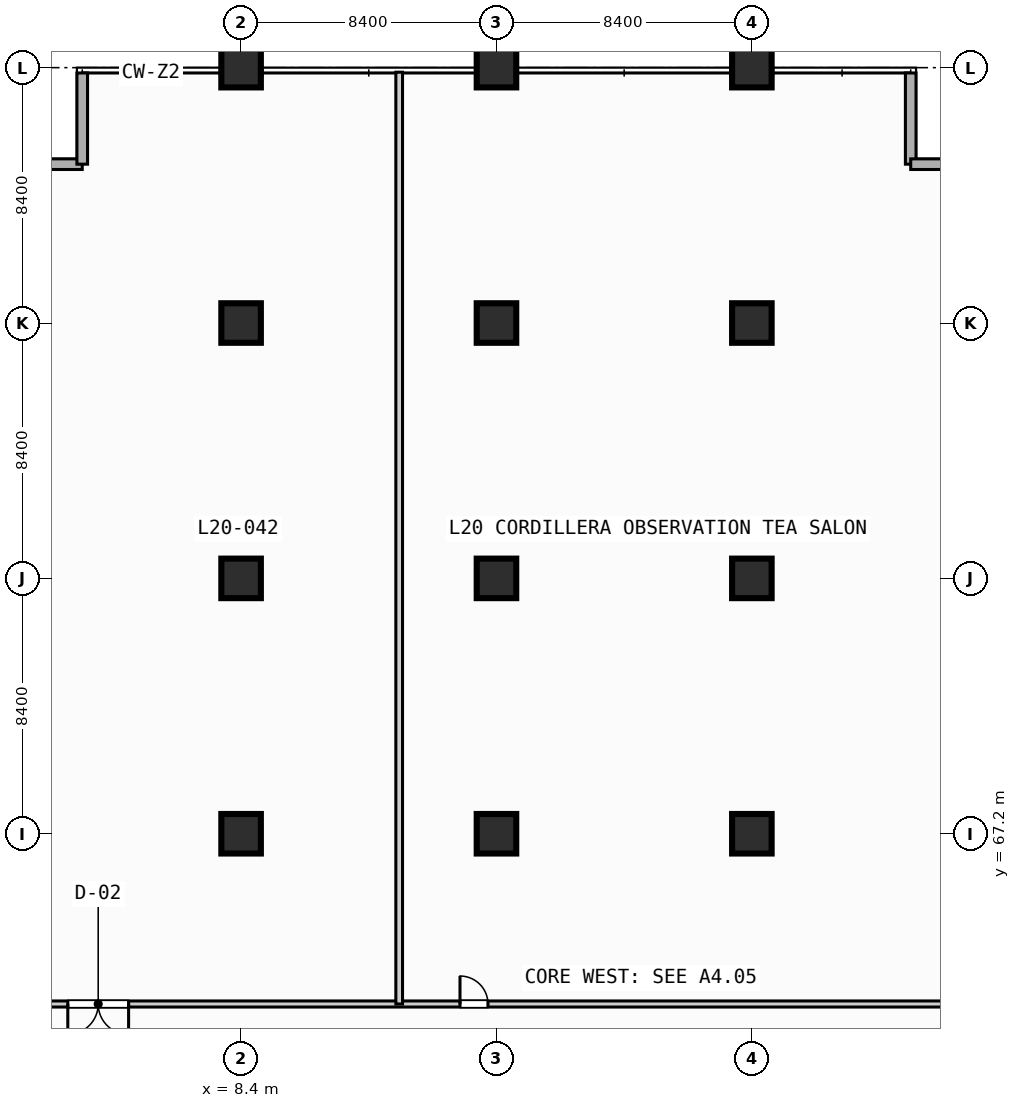
"""IFC4 building model, lengths in metres.
Left out: names, types, materials, properties, quantities, classifications, styles, units other than length and angle.
Written with IfcOpenShell. Run it as: python <this file> out.ifc"""

import sys

from ifc_helpers import new_model, si_unit, direction, frame, frame_2d, origin, origin_2d, place, context, subcontext, project, spatial, rectangle, extrude, element, fill, save


model = new_model("IFC4")
c1 = context("Model", 3, precision=1e-05, world=origin(), true_north=direction((0.0, 1.0)))
c2 = subcontext(c1, "Body", "Model", "MODEL_VIEW")
j1 = project(units=[si_unit("LENGTHUNIT", "METRE"), si_unit("PLANEANGLEUNIT", "RADIAN")], contexts=[c1])
p1 = place(None, origin())
s1 = spatial("IfcSite", under=j1, at=p1, CompositionType="ELEMENT")
p2 = place(p1, origin())
s2 = spatial("IfcBuilding", under=s1, at=p2, CompositionType="ELEMENT")
p3 = place(p2, frame((0.0, 0.0, 85.2)))
s3 = spatial("IfcBuildingStorey", under=s2, at=p3, CompositionType="ELEMENT", Elevation=85.2)
for number, where, z_axis, x_axis in (
    (1, (8.4, 67.2, 0.0), (0.0, 0.0, 1.0), (1.0, 0.0, 0.0)),
    (2, (8.4, 75.6, 0.0), (0.0, 0.0, 1.0), (1.0, 0.0, 0.0)),
    (3, (8.4, 84.0, 0.0), (0.0, 0.0, 1.0), (1.0, 0.0, 0.0)),
    (4, (8.4, 92.4, 0.0), (0.0, 0.0, 1.0), (1.0, 0.0, 0.0)),
    (5, (16.8, 67.2, 0.0), (0.0, 0.0, 1.0), (1.0, 0.0, 0.0)),
    (6, (16.8, 75.6, 0.0), (0.0, 0.0, 1.0), (1.0, 0.0, 0.0)),
    (7, (16.8, 84.0, 0.0), (0.0, 0.0, 1.0), (1.0, 0.0, 0.0)),
    (8, (16.8, 92.4, 0.0), (0.0, 0.0, 1.0), (1.0, 0.0, 0.0)),
    (9, (25.2, 67.2, 0.0), (0.0, 0.0, 1.0), (1.0, 0.0, 0.0)),
    (10, (25.2, 75.6, 0.0), (0.0, 0.0, 1.0), (1.0, 0.0, 0.0)),
    (11, (25.2, 84.0, 0.0), (0.0, 0.0, 1.0), (1.0, 0.0, 0.0)),
    (12, (25.2, 92.4, 0.0), (0.0, 0.0, 1.0), (1.0, 0.0, 0.0)),
):
    element("IfcColumn", number, at=place(p3, frame(where, z_axis=z_axis, x_axis=x_axis)), inside=s3, PredefinedType="COLUMN", context=c2, shape_type="SweptSolid", body=[
        extrude(rectangle(XDim=1.3, YDim=1.3, at=origin_2d()), origin(), (0.0, 0.0, 1.0), 4.4),
    ])
for number, where, z_axis, x_axis in (
    (13, (0.175, 89.225, 0.0), (0.0, 0.0, 1.0), (1.0, 0.0, 0.0)),
    (14, (3.175, 89.225, 0.0), (0.0, 0.0, 1.0), (0.0, 1.0, 0.0)),
    (15, (30.425, 92.225, 0.0), (0.0, 0.0, 1.0), (0.0, -1.0, 0.0)),
    (16, (30.425, 89.225, 0.0), (0.0, 0.0, 1.0), (1.0, 0.0, 0.0)),
):
    element("IfcWall", number, at=place(p3, frame(where, z_axis=z_axis, x_axis=x_axis)), inside=s3, PredefinedType="STANDARD", context=c2, shape_type="SweptSolid", body=[
        extrude(rectangle(XDim=3.0, YDim=0.35, at=frame_2d((1.5, 0.0))), origin(), (0.0, 0.0, 1.0), 4.15),
    ])
p4 = place(p3, frame((0.3, 61.6, 0.0), z_axis=(0.0, 0.0, 1.0), x_axis=(1.0, 0.0, 0.0)))
e17 = element("IfcWall", 17, at=p4, inside=s3, PredefinedType="PARTITIONING", context=c2, shape_type="SweptSolid", body=[
    extrude(rectangle(XDim=33.0, YDim=0.2, at=frame_2d((16.5, 0.0))), origin(), (0.0, 0.0, 1.0), 4.15),
])
p5 = place(p4, frame((2.4, 0.0, 0.0)))
e18 = element("IfcOpeningElement", 18, at=p5, cuts=e17, PredefinedType="OPENING", context=c2, shape_type="SweptSolid", body=[
    extrude(rectangle(XDim=2.0, YDim=2.15, at=frame_2d((1.0, 1.075))), frame((0.0, 0.11, 0.0), z_axis=(0.0, -1.0, 0.0), x_axis=(1.0, 0.0, 0.0)), (0.0, 0.0, 1.0), 0.22),
])
p6 = place(p4, frame((15.3, 0.0, 0.0)))
e19 = element("IfcOpeningElement", 19, at=p6, cuts=e17, PredefinedType="OPENING", context=c2, shape_type="SweptSolid", body=[
    extrude(rectangle(XDim=0.92, YDim=2.1, at=frame_2d((0.46, 1.05))), frame((0.0, 0.11, 0.0), z_axis=(0.0, -1.0, 0.0), x_axis=(1.0, 0.0, 0.0)), (0.0, 0.0, 1.0), 0.22),
])
p7 = place(p3, frame((13.6, 61.6, 0.0), z_axis=(0.0, 0.0, 1.0), x_axis=(0.0, 1.0, 0.0)))
e20 = element("IfcWall", 20, at=p7, inside=s3, PredefinedType="PARTITIONING", context=c2, shape_type="SweptSolid", body=[
    extrude(rectangle(XDim=30.65, YDim=0.22, at=frame_2d((15.325, 0.0))), origin(), (0.0, 0.0, 1.0), 4.15),
])
p8 = place(p5, origin())
e21 = element("IfcDoor", 21, at=p8, inside=s3, OperationType="SINGLE_SWING_RIGHT", PredefinedType="DOOR", context=c2, shape_type="SweptSolid", body=[
    extrude(rectangle(XDim=2.0, YDim=2.15, at=frame_2d((1.0, 1.075))), frame((0.0, 0.025, 0.0), z_axis=(0.0, -1.0, 0.0), x_axis=(1.0, 0.0, 0.0)), (0.0, 0.0, 1.0), 0.05),
])
fill(e18, e21)
p9 = place(p6, origin())
e22 = element("IfcDoor", 22, at=p9, inside=s3, OperationType="SINGLE_SWING_LEFT", PredefinedType="DOOR", context=c2, shape_type="SweptSolid", body=[
    extrude(rectangle(XDim=0.92, YDim=2.1, at=frame_2d((0.46, 1.05))), frame((0.0, 0.025, 0.0), z_axis=(0.0, -1.0, 0.0), x_axis=(1.0, 0.0, 0.0)), (0.0, 0.0, 1.0), 0.05),
])
fill(e19, e22)
save(model, sys.argv[1])
